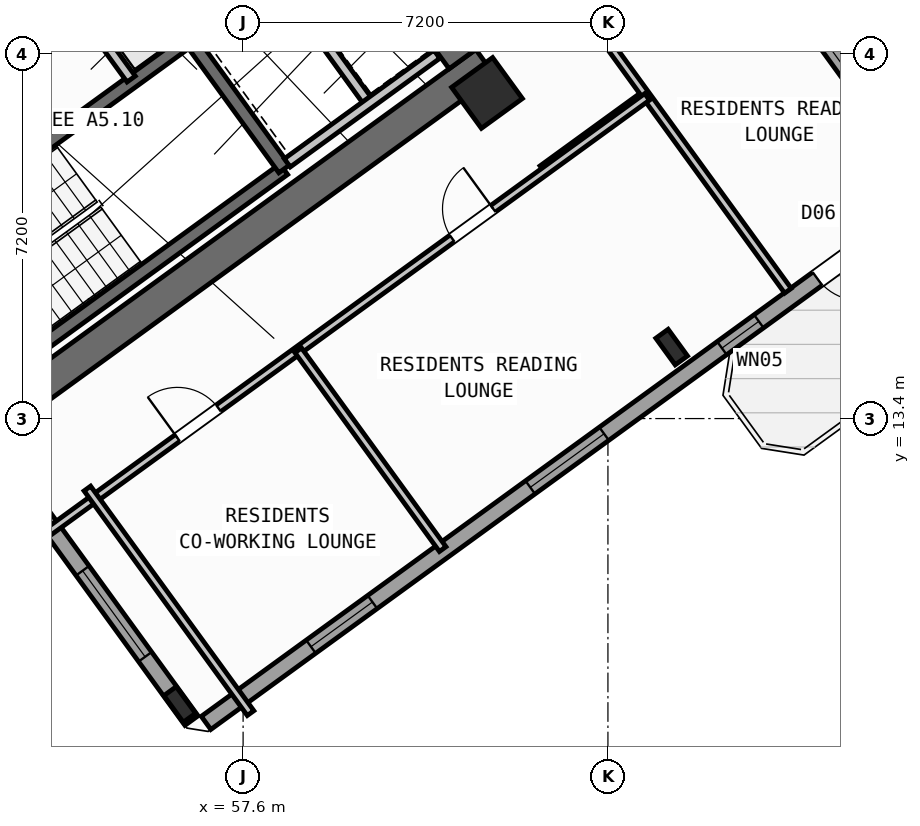
"""IFC4 building model, lengths in metres.
Left out: names, types, materials, properties, quantities, classifications, styles, units other than length and angle.
Written with IfcOpenShell. Run it as: python <this file> out.ifc"""

import sys

from ifc_helpers import new_model, si_unit, direction, frame, frame_2d, origin, origin_2d, place, context, subcontext, project, spatial, rectangle, hollow_rectangle, i_section, extrude, source, transform, mapped, element, fill, save


model = new_model("IFC4")
c1 = context("Model", 3, precision=1e-05, world=origin(), true_north=direction((0.0, 1.0)))
c2 = subcontext(c1, "Body", "Model", "MODEL_VIEW")
j1 = project(units=[si_unit("LENGTHUNIT", "METRE"), si_unit("PLANEANGLEUNIT", "RADIAN")], contexts=[c1])
p1 = place(None, origin())
s1 = spatial("IfcSite", under=j1, at=p1, CompositionType="ELEMENT")
p2 = place(p1, origin())
s2 = spatial("IfcBuilding", under=s1, at=p2, CompositionType="ELEMENT")
p3 = place(p2, frame((0.0, 0.0, 38.4)))
s3 = spatial("IfcBuildingStorey", under=s2, at=p3, CompositionType="ELEMENT", Elevation=38.4)
p4 = place(p3, frame((52.318, 13.11, 0.0), z_axis=(0.0, 0.0, 1.0), x_axis=(0.809019445368, 0.587781878776, 0.0)))
e1 = element("IfcWall", 1, at=p4, inside=s3, PredefinedType="SHEAR", context=c2, shape_type="SweptSolid", body=[
    extrude(rectangle(XDim=12.44, YDim=0.65, at=frame_2d((6.22, 0.0))), origin(), (0.0, 0.0, 1.0), 3.35),
])
p5 = place(p3, frame((61.929, 20.494, 0.0), z_axis=(0.0, 0.0, 1.0), x_axis=(-0.58782982593, 0.808984607855, 0.0)))
e2 = element("IfcWall", 2, at=p5, inside=s3, PredefinedType="SHEAR", context=c2, shape_type="SweptSolid", body=[
    extrude(rectangle(XDim=3.525, YDim=0.65, at=frame_2d((1.762, 0.0))), origin(), (0.0, 0.0, 1.0), 3.35),
])
m1 = source(origin(), c2, "Body", "SweptSolid", [
    extrude(i_section(OverallWidth=0.3, OverallDepth=0.65, WebThickness=0.016, FlangeThickness=0.031, at=origin_2d()), origin(), (0.0, 0.0, 1.0), 3.6),
])
for number, where, z_axis, x_axis in (
    (3, (56.35, 7.758, 0.0), (0.0, 0.0, 1.0), (0.809, 0.588, 0.0)),
    (4, (66.058, 14.811, 0.0), (0.0, 0.0, 1.0), (0.809, 0.588, 0.0)),
):
    element("IfcColumn", number, at=place(p3, frame(where, z_axis=z_axis, x_axis=x_axis)), inside=s3, PredefinedType="COLUMN", context=c2, shape_type="MappedRepresentation", body=[
        mapped(m1, transform((0.0, 0.0, 0.0), scale=1.0)),
    ])
m2 = source(origin(), c2, "Body", "SweptSolid", [
    extrude(hollow_rectangle(XDim=1.0, YDim=1.0, WallThickness=0.04, at=origin_2d()), origin(), (0.0, 0.0, 1.0), 3.6),
])
p6 = place(p3, frame((62.414, 19.827, 0.0), z_axis=(0.0, 0.0, 1.0), x_axis=(0.809016994375, 0.587785252292, 0.0)))
e5 = element("IfcColumn", 5, at=p6, inside=s3, PredefinedType="COLUMN", context=c2, shape_type="MappedRepresentation", body=[
    mapped(m2, transform((0.0, 0.0, 0.0), scale=1.0)),
])
p7 = place(p3, frame((58.455, 35.484, 0.0), z_axis=(0.0, 0.0, 1.0), x_axis=(0.587783625747, -0.809018176127, 0.0)))
e6 = element("IfcWall", 6, at=p7, inside=s3, PredefinedType="STANDARD", context=c2, shape_type="SweptSolid", body=[
    extrude(rectangle(XDim=21.587, YDim=0.32, at=frame_2d((10.794, 0.0))), origin(), (0.0, 0.0, 1.0), 2.725),
])
p8 = place(p7, frame((1.529, 0.0, 0.85)))
e7 = element("IfcOpeningElement", 7, at=p8, cuts=e6, PredefinedType="OPENING", context=c2, shape_type="SweptSolid", body=[
    extrude(rectangle(XDim=1.8, YDim=1.5, at=frame_2d((0.9, 0.75))), frame((0.0, 0.17, 0.0), z_axis=(0.0, -1.0, 0.0), x_axis=(1.0, 0.0, 0.0)), (0.0, 0.0, 1.0), 0.34),
])
p9 = place(p7, frame((10.444, 0.0, 0.85)))
e8 = element("IfcOpeningElement", 8, at=p9, cuts=e6, PredefinedType="OPENING", context=c2, shape_type="SweptSolid", body=[
    extrude(rectangle(XDim=1.8, YDim=1.5, at=frame_2d((0.9, 0.75))), frame((0.0, 0.17, 0.0), z_axis=(0.0, -1.0, 0.0), x_axis=(1.0, 0.0, 0.0)), (0.0, 0.0, 1.0), 0.34),
])
p10 = place(p7, frame((17.595, 0.0, 0.85)))
e9 = element("IfcOpeningElement", 9, at=p10, cuts=e6, PredefinedType="OPENING", context=c2, shape_type="SweptSolid", body=[
    extrude(rectangle(XDim=1.5, YDim=1.5, at=frame_2d((0.75, 0.75))), frame((0.0, 0.17, 0.0), z_axis=(0.0, -1.0, 0.0), x_axis=(1.0, 0.0, 0.0)), (0.0, 0.0, 1.0), 0.34),
])
p11 = place(p3, frame((71.098, 17.731, 0.0), z_axis=(0.0, 0.0, 1.0), x_axis=(-0.809021120468, -0.587779573171, 0.0)))
e10 = element("IfcWall", 10, at=p11, inside=s3, PredefinedType="STANDARD", context=c2, shape_type="SweptSolid", body=[
    extrude(rectangle(XDim=17.588, YDim=0.32, at=frame_2d((8.794, 0.0))), origin(), (0.0, 0.0, 1.0), 3.35),
])
p12 = place(p11, frame((1.624, 0.0, 0.0)))
e11 = element("IfcOpeningElement", 11, at=p12, cuts=e10, PredefinedType="OPENING", context=c2, shape_type="SweptSolid", body=[
    extrude(rectangle(XDim=1.05, YDim=2.15, at=frame_2d((0.525, 1.075))), frame((0.0, 0.17, 0.0), z_axis=(0.0, -1.0, 0.0), x_axis=(1.0, 0.0, 0.0)), (0.0, 0.0, 1.0), 0.34),
])
p13 = place(p11, frame((4.104, 0.0, 1.0)))
e12 = element("IfcOpeningElement", 12, at=p13, cuts=e10, PredefinedType="OPENING", context=c2, shape_type="SweptSolid", body=[
    extrude(rectangle(XDim=0.9, YDim=1.25, at=frame_2d((0.45, 0.625))), frame((0.0, 0.17, 0.0), z_axis=(0.0, -1.0, 0.0), x_axis=(1.0, 0.0, 0.0)), (0.0, 0.0, 1.0), 0.34),
])
p14 = place(p11, frame((7.879, 0.0, 0.85)))
e13 = element("IfcOpeningElement", 13, at=p14, cuts=e10, PredefinedType="OPENING", context=c2, shape_type="SweptSolid", body=[
    extrude(rectangle(XDim=1.8, YDim=1.5, at=frame_2d((0.9, 0.75))), frame((0.0, 0.17, 0.0), z_axis=(0.0, -1.0, 0.0), x_axis=(1.0, 0.0, 0.0)), (0.0, 0.0, 1.0), 0.34),
])
p15 = place(p11, frame((13.529, 0.0, 0.85)))
e14 = element("IfcOpeningElement", 14, at=p15, cuts=e10, PredefinedType="OPENING", context=c2, shape_type="SweptSolid", body=[
    extrude(rectangle(XDim=1.5, YDim=1.5, at=frame_2d((0.75, 0.75))), frame((0.0, 0.17, 0.0), z_axis=(0.0, -1.0, 0.0), x_axis=(1.0, 0.0, 0.0)), (0.0, 0.0, 1.0), 0.34),
])
p16 = place(p3, frame((56.581, 7.439, 0.0), z_axis=(0.0, 0.0, 1.0), x_axis=(-0.587785875463, 0.809016541614, 0.0)))
e15 = element("IfcWall", 15, at=p16, inside=s3, PredefinedType="STANDARD", context=c2, shape_type="SweptSolid", body=[
    extrude(rectangle(XDim=6.774, YDim=0.32, at=frame_2d((3.387, 0.0))), origin(), (0.0, 0.0, 1.0), 2.725),
])
p17 = place(p16, frame((1.556, 0.0, 0.8)))
e16 = element("IfcOpeningElement", 16, at=p17, cuts=e15, PredefinedType="OPENING", context=c2, shape_type="SweptSolid", body=[
    extrude(rectangle(XDim=2.1, YDim=1.55, at=frame_2d((1.05, 0.775))), frame((0.0, 0.17, 0.0), z_axis=(0.0, -1.0, 0.0), x_axis=(1.0, 0.0, 0.0)), (0.0, 0.0, 1.0), 0.34),
])
p18 = place(p3, frame((52.472, 14.013, 0.0), z_axis=(0.0, 0.0, 1.0), x_axis=(0.809028366311, 0.587769599847, 0.0)))
e17 = element("IfcWall", 17, at=p18, inside=s3, PredefinedType="SHEAR", context=c2, shape_type="SweptSolid", body=[
    extrude(rectangle(XDim=7.33, YDim=0.26, at=frame_2d((3.665, 0.0))), origin(), (0.0, 0.0, 1.0), 3.35),
])
p19 = place(p3, frame((50.615, 16.57, 0.0), z_axis=(0.0, 0.0, 1.0), x_axis=(0.809028366311, 0.587769599847, 0.0)))
e18 = element("IfcWall", 18, at=p19, inside=s3, PredefinedType="SHEAR", context=c2, shape_type="SweptSolid", body=[
    extrude(rectangle(XDim=7.33, YDim=0.26, at=frame_2d((3.665, 0.0))), origin(), (0.0, 0.0, 1.0), 3.35),
])
p20 = place(p19, frame((0.22, 0.0, 0.0)))
e19 = element("IfcOpeningElement", 19, at=p20, cuts=e18, PredefinedType="OPENING", context=c2, shape_type="SweptSolid", body=[
    extrude(rectangle(XDim=1.1, YDim=2.1, at=frame_2d((0.55, 1.05))), frame((0.0, 0.14, 0.0), z_axis=(0.0, -1.0, 0.0), x_axis=(1.0, 0.0, 0.0)), (0.0, 0.0, 1.0), 0.28),
])
p21 = place(p3, frame((58.41, 18.327, 0.0), z_axis=(0.0, 0.0, 1.0), x_axis=(-0.58776738483, 0.809029975545, 0.0)))
e20 = element("IfcWall", 20, at=p21, inside=s3, PredefinedType="SHEAR", context=c2, shape_type="SweptSolid", body=[
    extrude(rectangle(XDim=3.16, YDim=0.26, at=frame_2d((1.58, 0.0))), origin(), (0.0, 0.0, 1.0), 3.35),
])
p22 = place(p3, frame((55.391, 20.102, 0.0), z_axis=(0.0, 0.0, 1.0), x_axis=(-0.58778447739, 0.809017557374, 0.0)))
e21 = element("IfcWall", 21, at=p22, inside=s3, PredefinedType="STANDARD", context=c2, shape_type="SweptSolid", body=[
    extrude(rectangle(XDim=1.65, YDim=0.2, at=frame_2d((0.825, 0.0))), origin(), (0.0, 0.0, 1.0), 3.34),
])
p23 = place(p3, frame((60.067, 19.655, 0.0), z_axis=(0.0, 0.0, 1.0), x_axis=(-0.587800520745, 0.809005900975, 0.0)))
e22 = element("IfcWall", 22, at=p23, inside=s3, PredefinedType="STANDARD", context=c2, shape_type="SweptSolid", body=[
    extrude(rectangle(XDim=2.66, YDim=0.2, at=frame_2d((1.33, 0.0))), origin(), (0.0, 0.0, 1.0), 3.34),
])
p24 = place(p3, frame((58.472, 18.447, 0.0), z_axis=(0.0, 0.0, 1.0), x_axis=(0.809022487728, 0.587777691266, 0.0)))
e23 = element("IfcWall", 23, at=p24, inside=s3, PredefinedType="STANDARD", context=c2, shape_type="SweptSolid", body=[
    extrude(rectangle(XDim=3.648, YDim=0.2, at=frame_2d((1.824, 0.0))), origin(), (0.0, 0.0, 1.0), 3.34),
])
p25 = place(p3, frame((63.507, 18.322, 0.0), z_axis=(0.0, 0.0, 1.0), x_axis=(0.809034604122, 0.587761013791, 0.0)))
e24 = element("IfcWall", 24, at=p25, inside=s3, PredefinedType="PARTITIONING", context=c2, shape_type="SweptSolid", body=[
    extrude(rectangle(XDim=2.51, YDim=0.16, at=frame_2d((1.255, 0.0))), origin(), (0.0, 0.0, 1.0), 3.34),
])
p26 = place(p3, frame((68.353, 15.922, 0.0), z_axis=(0.0, 0.0, 1.0), x_axis=(-0.587782002009, 0.809019355834, 0.0)))
e25 = element("IfcWall", 25, at=p26, inside=s3, PredefinedType="PARTITIONING", context=c2, shape_type="SweptSolid", body=[
    extrude(rectangle(XDim=15.35, YDim=0.16, at=frame_2d((7.675, 0.0))), origin(), (0.0, 0.0, 1.0), 3.34),
])
p27 = place(p3, frame((53.705, 11.126, 0.0), z_axis=(0.0, 0.0, 1.0), x_axis=(0.809014504436, 0.587788679384, 0.0)))
e26 = element("IfcWall", 26, at=p27, inside=s3, PredefinedType="PARTITIONING", context=c2, shape_type="SweptSolid", body=[
    extrude(rectangle(XDim=14.67, YDim=0.16, at=frame_2d((7.335, 0.0))), origin(), (0.0, 0.0, 1.0), 3.34),
])
p28 = place(p27, frame((3.215, 0.0, 0.0)))
e27 = element("IfcOpeningElement", 27, at=p28, cuts=e26, PredefinedType="OPENING", context=c2, shape_type="SweptSolid", body=[
    extrude(rectangle(XDim=1.0, YDim=2.1, at=frame_2d((0.5, 1.05))), frame((0.0, 0.09, 0.0), z_axis=(0.0, -1.0, 0.0), x_axis=(1.0, 0.0, 0.0)), (0.0, 0.0, 1.0), 0.18),
])
p29 = place(p27, frame((9.915, 0.0, 0.0)))
e28 = element("IfcOpeningElement", 28, at=p29, cuts=e26, PredefinedType="OPENING", context=c2, shape_type="SweptSolid", body=[
    extrude(rectangle(XDim=1.0, YDim=2.1, at=frame_2d((0.5, 1.05))), frame((0.0, 0.09, 0.0), z_axis=(0.0, -1.0, 0.0), x_axis=(1.0, 0.0, 0.0)), (0.0, 0.0, 1.0), 0.18),
])
p30 = place(p3, frame((57.747, 7.586, 0.0), z_axis=(0.0, 0.0, 1.0), x_axis=(-0.587784893399, 0.809017255126, 0.0)))
e29 = element("IfcWall", 29, at=p30, inside=s3, PredefinedType="PARTITIONING", context=c2, shape_type="SweptSolid", body=[
    extrude(rectangle(XDim=5.48, YDim=0.16, at=frame_2d((2.74, 0.0))), origin(), (0.0, 0.0, 1.0), 3.34),
])
p31 = place(p3, frame((61.539, 10.823, 0.0), z_axis=(0.0, 0.0, 1.0), x_axis=(-0.587785532001, 0.809016791155, 0.0)))
e30 = element("IfcWall", 30, at=p31, inside=s3, PredefinedType="PARTITIONING", context=c2, shape_type="SweptSolid", body=[
    extrude(rectangle(XDim=4.85, YDim=0.16, at=frame_2d((2.425, 0.0))), origin(), (0.0, 0.0, 1.0), 3.34),
])
m3 = source(origin(), c2, "Body", "SweptSolid", [
    extrude(rectangle(XDim=1.05, YDim=2.15, at=frame_2d((0.525, 1.075))), frame((0.0, 0.025, 0.0), z_axis=(0.0, -1.0, 0.0), x_axis=(1.0, 0.0, 0.0)), (0.0, 0.0, 1.0), 0.05),
])
p32 = place(p12, origin())
e31 = element("IfcDoor", 31, at=p32, inside=s3, OperationType="SINGLE_SWING_LEFT", PredefinedType="DOOR", context=c2, shape_type="MappedRepresentation", body=[
    mapped(m3, transform((0.0, 0.0, 0.0), scale=1.0)),
])
fill(e11, e31)
m4 = source(origin(), c2, "Body", "SweptSolid", [
    extrude(rectangle(XDim=1.5, YDim=1.5, at=frame_2d((0.75, 0.75))), frame((0.0, 0.03, 0.0), z_axis=(0.0, -1.0, 0.0), x_axis=(1.0, 0.0, 0.0)), (0.0, 0.0, 1.0), 0.06),
])
p33 = place(p10, origin())
e32 = element("IfcWindow", 32, at=p33, inside=s3, PartitioningType="SINGLE_PANEL", PredefinedType="WINDOW", context=c2, shape_type="MappedRepresentation", body=[
    mapped(m4, transform((0.0, 0.0, 0.0), scale=1.0)),
])
fill(e9, e32)
m5 = source(origin(), c2, "Body", "SweptSolid", [
    extrude(rectangle(XDim=0.9, YDim=1.25, at=frame_2d((0.45, 0.625))), frame((0.0, 0.03, 0.0), z_axis=(0.0, -1.0, 0.0), x_axis=(1.0, 0.0, 0.0)), (0.0, 0.0, 1.0), 0.06),
])
p34 = place(p13, origin())
e33 = element("IfcWindow", 33, at=p34, inside=s3, PartitioningType="SINGLE_PANEL", PredefinedType="WINDOW", context=c2, shape_type="MappedRepresentation", body=[
    mapped(m5, transform((0.0, 0.0, 0.0), scale=1.0)),
])
fill(e12, e33)
m6 = source(origin(), c2, "Body", "SweptSolid", [
    extrude(rectangle(XDim=1.8, YDim=1.5, at=frame_2d((0.9, 0.75))), frame((0.0, 0.03, 0.0), z_axis=(0.0, -1.0, 0.0), x_axis=(1.0, 0.0, 0.0)), (0.0, 0.0, 1.0), 0.06),
])
p35 = place(p14, origin())
e34 = element("IfcWindow", 34, at=p35, inside=s3, PartitioningType="SINGLE_PANEL", PredefinedType="WINDOW", context=c2, shape_type="MappedRepresentation", body=[
    mapped(m6, transform((0.0, 0.0, 0.0), scale=1.0)),
])
fill(e13, e34)
p36 = place(p15, origin())
e35 = element("IfcWindow", 35, at=p36, inside=s3, PartitioningType="SINGLE_PANEL", PredefinedType="WINDOW", context=c2, shape_type="MappedRepresentation", body=[
    mapped(m4, transform((0.0, 0.0, 0.0), scale=1.0)),
])
fill(e14, e35)
m7 = source(origin(), c2, "Body", "SweptSolid", [
    extrude(rectangle(XDim=2.1, YDim=1.55, at=frame_2d((1.05, 0.775))), frame((0.0, 0.03, 0.0), z_axis=(0.0, -1.0, 0.0), x_axis=(1.0, 0.0, 0.0)), (0.0, 0.0, 1.0), 0.06),
])
p37 = place(p17, origin())
e36 = element("IfcWindow", 36, at=p37, inside=s3, PartitioningType="SINGLE_PANEL", PredefinedType="WINDOW", context=c2, shape_type="MappedRepresentation", body=[
    mapped(m7, transform((0.0, 0.0, 0.0), scale=1.0)),
])
fill(e16, e36)
m8 = source(origin(), c2, "Body", "SweptSolid", [
    extrude(rectangle(XDim=1.0, YDim=2.1, at=frame_2d((0.5, 1.05))), frame((0.0, 0.025, 0.0), z_axis=(0.0, -1.0, 0.0), x_axis=(1.0, 0.0, 0.0)), (0.0, 0.0, 1.0), 0.05),
])
p38 = place(p28, origin())
e37 = element("IfcDoor", 37, at=p38, inside=s3, OperationType="SINGLE_SWING_LEFT", PredefinedType="DOOR", context=c2, shape_type="MappedRepresentation", body=[
    mapped(m8, transform((0.0, 0.0, 0.0), scale=1.0)),
])
fill(e27, e37)
p39 = place(p29, origin())
e38 = element("IfcDoor", 38, at=p39, inside=s3, OperationType="SINGLE_SWING_RIGHT", PredefinedType="DOOR", context=c2, shape_type="MappedRepresentation", body=[
    mapped(m8, transform((0.0, 0.0, 0.0), scale=1.0)),
])
fill(e28, e38)
save(model, sys.argv[1])
